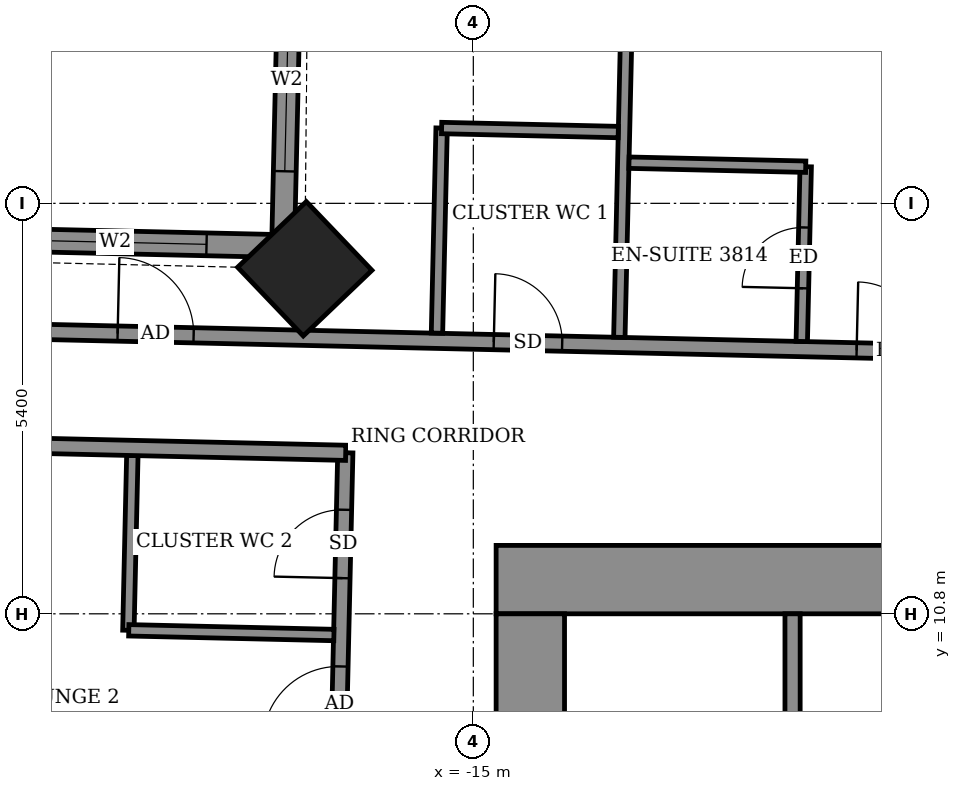
"""IFC4 building model, lengths in metres.
Left out: names, types, materials, properties, quantities, classifications, styles, units other than length and angle.
Written with IfcOpenShell. Run it as: python <this file> out.ifc"""

import sys

from ifc_helpers import new_model, si_unit, direction, frame, frame_2d, origin, origin_2d, place, context, subcontext, project, spatial, rectangle, extrude, element, fill, save


model = new_model("IFC4")
c1 = context("Model", 3, precision=1e-05, world=origin(), true_north=direction((0.0, 1.0)))
c2 = subcontext(c1, "Body", "Model", "MODEL_VIEW")
j1 = project(units=[si_unit("LENGTHUNIT", "METRE"), si_unit("PLANEANGLEUNIT", "RADIAN")], contexts=[c1])
p1 = place(None, origin())
s1 = spatial("IfcSite", under=j1, at=p1, CompositionType="ELEMENT")
p2 = place(p1, origin())
s2 = spatial("IfcBuilding", under=s1, at=p2, CompositionType="ELEMENT")
p3 = place(p2, frame((0.0, 0.0, 152.7)))
s3 = spatial("IfcBuildingStorey", under=s2, at=p3, CompositionType="ELEMENT", Elevation=152.7)
p4 = place(p3, frame((-17.217, 15.339, -0.55), z_axis=(0.0, 0.0, 1.0), x_axis=(-0.722976563275, -0.690872556232, 0.0)))
e1 = element("IfcColumn", 1, at=p4, inside=s3, PredefinedType="COLUMN", context=c2, shape_type="SweptSolid", body=[
    extrude(rectangle(XDim=1.25, YDim=1.25, at=origin_2d()), origin(), (0.0, 0.0, 1.0), 3.6),
])
p5 = place(p3, frame((-17.389, 20.637, 0.0), z_axis=(0.0, 0.0, 1.0), x_axis=(-0.022801259434, -0.999740017489, 0.0)))
e2 = element("IfcWall", 2, at=p5, inside=s3, PredefinedType="SOLIDWALL", context=c2, shape_type="SweptSolid", body=[
    extrude(rectangle(XDim=5.0, YDim=0.3, at=frame_2d((2.5, 0.0))), origin(), (0.0, 0.0, 1.0), 2.55),
])
p6 = place(p5, frame((1.616, 0.0, 0.9)))
e3 = element("IfcOpeningElement", 3, at=p6, cuts=e2, PredefinedType="OPENING", context=c2, shape_type="SweptSolid", body=[
    extrude(rectangle(XDim=2.4, YDim=1.5, at=frame_2d((1.2, 0.75))), frame((0.0, 0.16, 0.0), z_axis=(0.0, -1.0, 0.0), x_axis=(1.0, 0.0, 0.0)), (0.0, 0.0, 1.0), 0.32),
])
p7 = place(p3, frame((-17.503, 15.638, 0.0), z_axis=(0.0, 0.0, 1.0), x_axis=(-0.999744350543, 0.022610474516, 0.0)))
e4 = element("IfcWall", 4, at=p7, inside=s3, PredefinedType="SOLIDWALL", context=c2, shape_type="SweptSolid", body=[
    extrude(rectangle(XDim=4.999, YDim=0.3, at=frame_2d((2.5, 0.0))), origin(), (0.0, 0.0, 1.0), 2.55),
])
p8 = place(p7, frame((1.007, 0.0, 0.9)))
e5 = element("IfcOpeningElement", 5, at=p8, cuts=e4, PredefinedType="OPENING", context=c2, shape_type="SweptSolid", body=[
    extrude(rectangle(XDim=2.4, YDim=1.5, at=frame_2d((1.2, 0.75))), frame((0.0, 0.16, 0.0), z_axis=(0.0, -1.0, 0.0), x_axis=(1.0, 0.0, 0.0)), (0.0, 0.0, 1.0), 0.32),
])
p9 = place(p3, frame((-17.32, -15.098, 0.0), z_axis=(0.0, 0.0, 1.0), x_axis=(0.022694293906, 0.999742451346, 0.0)))
e6 = element("IfcWall", 6, at=p9, inside=s3, PredefinedType="PARTITIONING", context=c2, shape_type="SweptSolid", body=[
    extrude(rectangle(XDim=28.024, YDim=0.2, at=frame_2d((14.012, 0.0))), origin(), (0.0, 0.0, 1.0), 3.05),
])
p10 = place(p9, frame((24.212, 0.0, 0.0)))
e7 = element("IfcOpeningElement", 7, at=p10, cuts=e6, PredefinedType="OPENING", context=c2, shape_type="SweptSolid", body=[
    extrude(rectangle(XDim=1.0, YDim=2.1, at=frame_2d((0.5, 1.05))), frame((0.0, 0.11, 0.0), z_axis=(0.0, -1.0, 0.0), x_axis=(1.0, 0.0, 0.0)), (0.0, 0.0, 1.0), 0.22),
])
p11 = place(p9, frame((26.374, 0.0, 0.0)))
e8 = element("IfcOpeningElement", 8, at=p11, cuts=e6, PredefinedType="OPENING", context=c2, shape_type="SweptSolid", body=[
    extrude(rectangle(XDim=0.9, YDim=2.1, at=frame_2d((0.45, 1.05))), frame((0.0, 0.11, 0.0), z_axis=(0.0, -1.0, 0.0), x_axis=(1.0, 0.0, 0.0)), (0.0, 0.0, 1.0), 0.22),
])
p12 = place(p9, frame((21.774, 0.0, 0.0)))
e9 = element("IfcOpeningElement", 9, at=p12, cuts=e6, PredefinedType="OPENING", context=c2, shape_type="SweptSolid", body=[
    extrude(rectangle(XDim=1.0, YDim=2.1, at=frame_2d((0.5, 1.05))), frame((0.0, 0.11, 0.0), z_axis=(0.0, -1.0, 0.0), x_axis=(1.0, 0.0, 0.0)), (0.0, 0.0, 1.0), 0.22),
])
p13 = place(p9, frame((18.65, 0.0, 0.0)))
e10 = element("IfcOpeningElement", 10, at=p13, cuts=e6, PredefinedType="OPENING", context=c2, shape_type="SweptSolid", body=[
    extrude(rectangle(XDim=1.0, YDim=2.1, at=frame_2d((0.5, 1.05))), frame((0.0, 0.11, 0.0), z_axis=(0.0, -1.0, 0.0), x_axis=(1.0, 0.0, 0.0)), (0.0, 0.0, 1.0), 0.22),
])
p14 = place(p9, frame((15.626, 0.0, 0.0)))
e11 = element("IfcOpeningElement", 11, at=p14, cuts=e6, PredefinedType="OPENING", context=c2, shape_type="SweptSolid", body=[
    extrude(rectangle(XDim=1.0, YDim=2.1, at=frame_2d((0.5, 1.05))), frame((0.0, 0.11, 0.0), z_axis=(0.0, -1.0, 0.0), x_axis=(1.0, 0.0, 0.0)), (0.0, 0.0, 1.0), 0.22),
])
p15 = place(p9, frame((12.557, 0.0, 0.0)))
e12 = element("IfcOpeningElement", 12, at=p15, cuts=e6, PredefinedType="OPENING", context=c2, shape_type="SweptSolid", body=[
    extrude(rectangle(XDim=1.0, YDim=2.1, at=frame_2d((0.5, 1.05))), frame((0.0, 0.11, 0.0), z_axis=(0.0, -1.0, 0.0), x_axis=(1.0, 0.0, 0.0)), (0.0, 0.0, 1.0), 0.22),
])
p16 = place(p9, frame((10.049, 0.0, 0.0)))
e13 = element("IfcOpeningElement", 13, at=p16, cuts=e6, PredefinedType="OPENING", context=c2, shape_type="SweptSolid", body=[
    extrude(rectangle(XDim=1.0, YDim=2.1, at=frame_2d((0.5, 1.05))), frame((0.0, 0.11, 0.0), z_axis=(0.0, -1.0, 0.0), x_axis=(1.0, 0.0, 0.0)), (0.0, 0.0, 1.0), 0.22),
])
p17 = place(p9, frame((7.849, 0.0, 0.0)))
e14 = element("IfcOpeningElement", 14, at=p17, cuts=e6, PredefinedType="OPENING", context=c2, shape_type="SweptSolid", body=[
    extrude(rectangle(XDim=0.9, YDim=2.1, at=frame_2d((0.45, 1.05))), frame((0.0, 0.11, 0.0), z_axis=(0.0, -1.0, 0.0), x_axis=(1.0, 0.0, 0.0)), (0.0, 0.0, 1.0), 0.22),
])
p18 = place(p9, frame((4.199, 0.0, 0.0)))
e15 = element("IfcOpeningElement", 15, at=p18, cuts=e6, PredefinedType="OPENING", context=c2, shape_type="SweptSolid", body=[
    extrude(rectangle(XDim=1.0, YDim=2.1, at=frame_2d((0.5, 1.05))), frame((0.0, 0.11, 0.0), z_axis=(0.0, -1.0, 0.0), x_axis=(1.0, 0.0, 0.0)), (0.0, 0.0, 1.0), 0.22),
])
p19 = place(p9, frame((0.75, 0.0, 0.0)))
e16 = element("IfcOpeningElement", 16, at=p19, cuts=e6, PredefinedType="OPENING", context=c2, shape_type="SweptSolid", body=[
    extrude(rectangle(XDim=0.9, YDim=2.1, at=frame_2d((0.45, 1.05))), frame((0.0, 0.11, 0.0), z_axis=(0.0, -1.0, 0.0), x_axis=(1.0, 0.0, 0.0)), (0.0, 0.0, 1.0), 0.22),
])
p20 = place(p3, frame((-19.538, 10.583, 0.0), z_axis=(0.0, 0.0, 1.0), x_axis=(0.022612884682, 0.999744296031, 0.0)))
e17 = element("IfcWall", 17, at=p20, inside=s3, PredefinedType="PARTITIONING", context=c2, shape_type="SweptSolid", body=[
    extrude(rectangle(XDim=2.3, YDim=0.15, at=frame_2d((1.15, 0.0))), origin(), (0.0, 0.0, 1.0), 3.05),
])
p21 = place(p3, frame((-19.533, 10.583, 0.0), z_axis=(0.0, 0.0, 1.0), x_axis=(0.999736155505, -0.022969966847, 0.0)))
e18 = element("IfcWall", 18, at=p21, inside=s3, PredefinedType="PARTITIONING", context=c2, shape_type="SweptSolid", body=[
    extrude(rectangle(XDim=2.7, YDim=0.15, at=frame_2d((1.35, 0.0))), origin(), (0.0, 0.0, 1.0), 3.05),
])
p22 = place(p3, frame((-21.313, 13.024, 0.0), z_axis=(0.0, 0.0, 1.0), x_axis=(0.999738699021, -0.022858995594, 0.0)))
e19 = element("IfcWall", 19, at=p22, inside=s3, PredefinedType="PARTITIONING", context=c2, shape_type="SweptSolid", body=[
    extrude(rectangle(XDim=4.635, YDim=0.2, at=frame_2d((2.318, 0.0))), origin(), (0.0, 0.0, 1.0), 3.05),
])
p23 = place(p3, frame((-21.279, 14.523, 0.0), z_axis=(0.0, 0.0, 1.0), x_axis=(0.999742669174, -0.02268469602, 0.0)))
e20 = element("IfcWall", 20, at=p23, inside=s3, PredefinedType="PARTITIONING", context=c2, shape_type="SweptSolid", body=[
    extrude(rectangle(XDim=40.639, YDim=0.2, at=frame_2d((20.319, 0.0))), origin(), (0.0, 0.0, 1.0), 3.05),
])
p24 = place(p23, frame((37.65, 0.0, 0.0)))
e21 = element("IfcOpeningElement", 21, at=p24, cuts=e20, PredefinedType="OPENING", context=c2, shape_type="SweptSolid", body=[
    extrude(rectangle(XDim=0.9, YDim=2.1, at=frame_2d((0.45, 1.05))), frame((0.0, 0.11, 0.0), z_axis=(0.0, -1.0, 0.0), x_axis=(1.0, 0.0, 0.0)), (0.0, 0.0, 1.0), 0.22),
])
p25 = place(p23, frame((32.775, 0.0, 0.0)))
e22 = element("IfcOpeningElement", 22, at=p25, cuts=e20, PredefinedType="OPENING", context=c2, shape_type="SweptSolid", body=[
    extrude(rectangle(XDim=0.9, YDim=2.1, at=frame_2d((0.45, 1.05))), frame((0.0, 0.11, 0.0), z_axis=(0.0, -1.0, 0.0), x_axis=(1.0, 0.0, 0.0)), (0.0, 0.0, 1.0), 0.22),
])
p26 = place(p23, frame((30.4, 0.0, 0.0)))
e23 = element("IfcOpeningElement", 23, at=p26, cuts=e20, PredefinedType="OPENING", context=c2, shape_type="SweptSolid", body=[
    extrude(rectangle(XDim=0.9, YDim=2.1, at=frame_2d((0.45, 1.05))), frame((0.0, 0.11, 0.0), z_axis=(0.0, -1.0, 0.0), x_axis=(1.0, 0.0, 0.0)), (0.0, 0.0, 1.0), 0.22),
])
p27 = place(p23, frame((23.225, 0.0, 0.0)))
e24 = element("IfcOpeningElement", 24, at=p27, cuts=e20, PredefinedType="OPENING", context=c2, shape_type="SweptSolid", body=[
    extrude(rectangle(XDim=0.9, YDim=2.1, at=frame_2d((0.45, 1.05))), frame((0.0, 0.11, 0.0), z_axis=(0.0, -1.0, 0.0), x_axis=(1.0, 0.0, 0.0)), (0.0, 0.0, 1.0), 0.22),
])
p28 = place(p23, frame((20.85, 0.0, 0.0)))
e25 = element("IfcOpeningElement", 25, at=p28, cuts=e20, PredefinedType="OPENING", context=c2, shape_type="SweptSolid", body=[
    extrude(rectangle(XDim=0.9, YDim=2.1, at=frame_2d((0.45, 1.05))), frame((0.0, 0.11, 0.0), z_axis=(0.0, -1.0, 0.0), x_axis=(1.0, 0.0, 0.0)), (0.0, 0.0, 1.0), 0.22),
])
p29 = place(p23, frame((13.675, 0.0, 0.0)))
e26 = element("IfcOpeningElement", 26, at=p29, cuts=e20, PredefinedType="OPENING", context=c2, shape_type="SweptSolid", body=[
    extrude(rectangle(XDim=0.9, YDim=2.1, at=frame_2d((0.45, 1.05))), frame((0.0, 0.11, 0.0), z_axis=(0.0, -1.0, 0.0), x_axis=(1.0, 0.0, 0.0)), (0.0, 0.0, 1.0), 0.22),
])
p30 = place(p23, frame((11.325, 0.0, 0.0)))
e27 = element("IfcOpeningElement", 27, at=p30, cuts=e20, PredefinedType="OPENING", context=c2, shape_type="SweptSolid", body=[
    extrude(rectangle(XDim=0.9, YDim=2.1, at=frame_2d((0.45, 1.05))), frame((0.0, 0.11, 0.0), z_axis=(0.0, -1.0, 0.0), x_axis=(1.0, 0.0, 0.0)), (0.0, 0.0, 1.0), 0.22),
])
p31 = place(p23, frame((1.6, 0.0, 0.0)))
e28 = element("IfcOpeningElement", 28, at=p31, cuts=e20, PredefinedType="OPENING", context=c2, shape_type="SweptSolid", body=[
    extrude(rectangle(XDim=1.0, YDim=2.1, at=frame_2d((0.5, 1.05))), frame((0.0, 0.11, 0.0), z_axis=(0.0, -1.0, 0.0), x_axis=(1.0, 0.0, 0.0)), (0.0, 0.0, 1.0), 0.22),
])
p32 = place(p23, frame((6.55, 0.0, 0.0)))
e29 = element("IfcOpeningElement", 29, at=p32, cuts=e20, PredefinedType="OPENING", context=c2, shape_type="SweptSolid", body=[
    extrude(rectangle(XDim=0.9, YDim=2.1, at=frame_2d((0.45, 1.05))), frame((0.0, 0.11, 0.0), z_axis=(0.0, -1.0, 0.0), x_axis=(1.0, 0.0, 0.0)), (0.0, 0.0, 1.0), 0.22),
])
p33 = place(p3, frame((-15.478, 14.492, 0.0), z_axis=(0.0, 0.0, 1.0), x_axis=(0.02260842146, 0.999744396973, 0.0)))
e30 = element("IfcWall", 30, at=p33, inside=s3, PredefinedType="PARTITIONING", context=c2, shape_type="SweptSolid", body=[
    extrude(rectangle(XDim=2.7, YDim=0.15, at=frame_2d((1.35, 0.0))), origin(), (0.0, 0.0, 1.0), 3.05),
])
p34 = place(p3, frame((-13.079, 14.437, 0.0), z_axis=(0.0, 0.0, 1.0), x_axis=(0.022688785847, 0.999742576365, 0.0)))
e31 = element("IfcWall", 31, at=p34, inside=s3, PredefinedType="PARTITIONING", context=c2, shape_type="SweptSolid", body=[
    extrude(rectangle(XDim=5.95, YDim=0.15, at=frame_2d((2.975, 0.0))), origin(), (0.0, 0.0, 1.0), 2.55),
])
p35 = place(p3, frame((-10.679, 14.383, 0.0), z_axis=(0.0, 0.0, 1.0), x_axis=(0.022615284993, 0.999744241736, 0.0)))
e32 = element("IfcWall", 32, at=p35, inside=s3, PredefinedType="PARTITIONING", context=c2, shape_type="SweptSolid", body=[
    extrude(rectangle(XDim=2.299, YDim=0.15, at=frame_2d((1.15, 0.0))), origin(), (0.0, 0.0, 1.0), 3.05),
])
p36 = place(p35, frame((0.7, 0.0, 0.0)))
e33 = element("IfcOpeningElement", 33, at=p36, cuts=e32, PredefinedType="OPENING", context=c2, shape_type="SweptSolid", body=[
    extrude(rectangle(XDim=0.8, YDim=2.1, at=frame_2d((0.4, 1.05))), frame((0.0, 0.085, 0.0), z_axis=(0.0, -1.0, 0.0), x_axis=(1.0, 0.0, 0.0)), (0.0, 0.0, 1.0), 0.17),
])
p37 = place(p3, frame((-12.952, 16.735, 0.0), z_axis=(0.0, 0.0, 1.0), x_axis=(0.999738082346, -0.022885950011, 0.0)))
e34 = element("IfcWall", 34, at=p37, inside=s3, PredefinedType="PARTITIONING", context=c2, shape_type="SweptSolid", body=[
    extrude(rectangle(XDim=2.325, YDim=0.15, at=frame_2d((1.163, 0.0))), origin(), (0.0, 0.0, 1.0), 3.05),
])
p38 = place(p3, frame((-15.417, 17.191, 0.0), z_axis=(0.0, 0.0, 1.0), x_axis=(0.999740260747, -0.02279059109, 0.0)))
e35 = element("IfcWall", 35, at=p38, inside=s3, PredefinedType="PARTITIONING", context=c2, shape_type="SweptSolid", body=[
    extrude(rectangle(XDim=2.324, YDim=0.15, at=frame_2d((1.162, 0.0))), origin(), (0.0, 0.0, 1.0), 3.05),
])
p39 = place(p3, frame((-14.7, 11.25, 0.0), z_axis=(0.0, 0.0, 1.0), x_axis=(1.0, 0.0, 0.0)))
e36 = element("IfcWall", 36, at=p39, inside=s3, PredefinedType="SHEAR", context=c2, shape_type="SweptSolid", body=[
    extrude(rectangle(XDim=29.4, YDim=0.9, at=frame_2d((14.7, 0.0))), origin(), (0.0, 0.0, 1.0), 3.6),
])
p40 = place(p3, frame((-14.25, -10.8, 0.0), z_axis=(0.0, 0.0, 1.0), x_axis=(0.0, 1.0, 0.0)))
e37 = element("IfcWall", 37, at=p40, inside=s3, PredefinedType="SHEAR", context=c2, shape_type="SweptSolid", body=[
    extrude(rectangle(XDim=21.6, YDim=0.9, at=frame_2d((10.8, 0.0))), origin(), (0.0, 0.0, 1.0), 3.6),
])
p41 = place(p40, frame((8.25, 0.0, 0.0)))
e38 = element("IfcOpeningElement", 38, at=p41, cuts=e37, PredefinedType="OPENING", context=c2, shape_type="SweptSolid", body=[
    extrude(rectangle(XDim=1.2, YDim=2.1, at=frame_2d((0.6, 1.05))), frame((0.0, 0.46, 0.0), z_axis=(0.0, -1.0, 0.0), x_axis=(1.0, 0.0, 0.0)), (0.0, 0.0, 1.0), 0.92),
])
p42 = place(p40, frame((15.25, 0.0, 0.0)))
e39 = element("IfcOpeningElement", 39, at=p42, cuts=e37, PredefinedType="OPENING", context=c2, shape_type="SweptSolid", body=[
    extrude(rectangle(XDim=1.2, YDim=2.1, at=frame_2d((0.6, 1.05))), frame((0.0, 0.46, 0.0), z_axis=(0.0, -1.0, 0.0), x_axis=(1.0, 0.0, 0.0)), (0.0, 0.0, 1.0), 0.92),
])
p43 = place(p3, frame((-10.8, 8.2, 0.0), z_axis=(0.0, 0.0, 1.0), x_axis=(0.0, 1.0, 0.0)))
e40 = element("IfcWall", 40, at=p43, inside=s3, PredefinedType="STANDARD", context=c2, shape_type="SweptSolid", body=[
    extrude(rectangle(XDim=2.6, YDim=0.2, at=frame_2d((1.3, 0.0))), origin(), (0.0, 0.0, 1.0), 3.05),
])
p44 = place(p6, origin())
e41 = element("IfcWindow", 41, at=p44, inside=s3, PartitioningType="DOUBLE_PANEL_VERTICAL", PredefinedType="WINDOW", context=c2, shape_type="SweptSolid", body=[
    extrude(rectangle(XDim=2.4, YDim=1.5, at=frame_2d((1.2, 0.75))), frame((0.0, 0.03, 0.0), z_axis=(0.0, -1.0, 0.0), x_axis=(1.0, 0.0, 0.0)), (0.0, 0.0, 1.0), 0.06),
])
fill(e3, e41)
p45 = place(p8, origin())
e42 = element("IfcWindow", 42, at=p45, inside=s3, PartitioningType="DOUBLE_PANEL_VERTICAL", PredefinedType="WINDOW", context=c2, shape_type="SweptSolid", body=[
    extrude(rectangle(XDim=2.4, YDim=1.5, at=frame_2d((1.2, 0.75))), frame((0.0, 0.03, 0.0), z_axis=(0.0, -1.0, 0.0), x_axis=(1.0, 0.0, 0.0)), (0.0, 0.0, 1.0), 0.06),
])
fill(e5, e42)
p46 = place(p30, origin())
e43 = element("IfcDoor", 43, at=p46, inside=s3, OperationType="SINGLE_SWING_RIGHT", PredefinedType="DOOR", context=c2, shape_type="SweptSolid", body=[
    extrude(rectangle(XDim=0.9, YDim=2.1, at=frame_2d((0.45, 1.05))), frame((0.0, 0.025, 0.0), z_axis=(0.0, -1.0, 0.0), x_axis=(1.0, 0.0, 0.0)), (0.0, 0.0, 1.0), 0.05),
])
fill(e27, e43)
p47 = place(p36, origin())
e44 = element("IfcDoor", 44, at=p47, inside=s3, OperationType="SINGLE_SWING_RIGHT", PredefinedType="DOOR", context=c2, shape_type="SweptSolid", body=[
    extrude(rectangle(XDim=0.8, YDim=2.1, at=frame_2d((0.4, 1.05))), frame((0.0, 0.025, 0.0), z_axis=(0.0, -1.0, 0.0), x_axis=(1.0, 0.0, 0.0)), (0.0, 0.0, 1.0), 0.05),
])
fill(e33, e44)
p48 = place(p31, origin())
e45 = element("IfcDoor", 45, at=p48, inside=s3, OperationType="SINGLE_SWING_RIGHT", PredefinedType="DOOR", context=c2, shape_type="SweptSolid", body=[
    extrude(rectangle(XDim=1.0, YDim=2.1, at=frame_2d((0.5, 1.05))), frame((0.0, 0.025, 0.0), z_axis=(0.0, -1.0, 0.0), x_axis=(1.0, 0.0, 0.0)), (0.0, 0.0, 1.0), 0.05),
])
fill(e28, e45)
p49 = place(p32, origin())
e46 = element("IfcDoor", 46, at=p49, inside=s3, OperationType="SINGLE_SWING_RIGHT", PredefinedType="DOOR", context=c2, shape_type="SweptSolid", body=[
    extrude(rectangle(XDim=0.9, YDim=2.1, at=frame_2d((0.45, 1.05))), frame((0.0, 0.025, 0.0), z_axis=(0.0, -1.0, 0.0), x_axis=(1.0, 0.0, 0.0)), (0.0, 0.0, 1.0), 0.05),
])
fill(e29, e46)
p50 = place(p10, origin())
e47 = element("IfcDoor", 47, at=p50, inside=s3, OperationType="SINGLE_SWING_LEFT", PredefinedType="DOOR", context=c2, shape_type="SweptSolid", body=[
    extrude(rectangle(XDim=1.0, YDim=2.1, at=frame_2d((0.5, 1.05))), frame((0.0, 0.025, 0.0), z_axis=(0.0, -1.0, 0.0), x_axis=(1.0, 0.0, 0.0)), (0.0, 0.0, 1.0), 0.05),
])
fill(e7, e47)
p51 = place(p11, origin())
e48 = element("IfcDoor", 48, at=p51, inside=s3, OperationType="SINGLE_SWING_LEFT", PredefinedType="DOOR", context=c2, shape_type="SweptSolid", body=[
    extrude(rectangle(XDim=0.9, YDim=2.1, at=frame_2d((0.45, 1.05))), frame((0.0, 0.025, 0.0), z_axis=(0.0, -1.0, 0.0), x_axis=(1.0, 0.0, 0.0)), (0.0, 0.0, 1.0), 0.05),
])
fill(e8, e48)
save(model, sys.argv[1])
